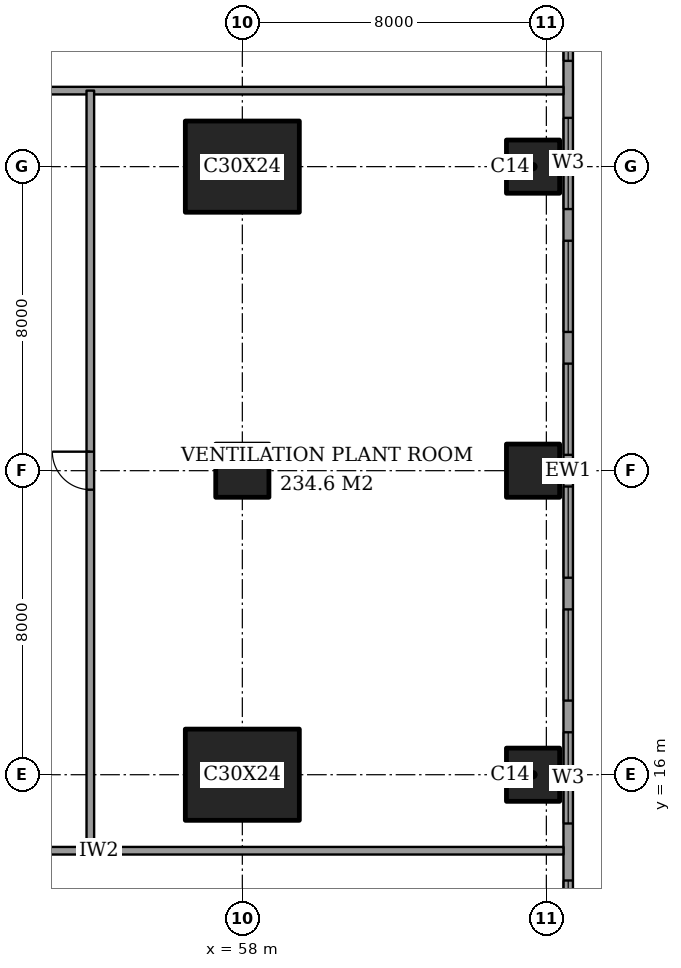
"""IFC4 building model, lengths in metres.
Left out: names, types, materials, properties, quantities, classifications, styles, units other than length and angle.
Written with IfcOpenShell. Run it as: python <this file> out.ifc"""

import sys

from ifc_helpers import new_model, si_unit, direction, frame, frame_2d, origin, origin_2d, place, context, subcontext, project, spatial, rectangle, extrude, element, fill, save


model = new_model("IFC4")
c1 = context("Model", 3, precision=1e-05, world=origin(), true_north=direction((0.0, 1.0)))
c2 = subcontext(c1, "Body", "Model", "MODEL_VIEW")
j1 = project(units=[si_unit("LENGTHUNIT", "METRE"), si_unit("PLANEANGLEUNIT", "RADIAN")], contexts=[c1])
p1 = place(None, origin())
s1 = spatial("IfcSite", under=j1, at=p1, CompositionType="ELEMENT")
p2 = place(p1, origin())
s2 = spatial("IfcBuilding", under=s1, at=p2, CompositionType="ELEMENT")
p3 = place(p2, frame((0.0, 0.0, 296.6)))
s3 = spatial("IfcBuildingStorey", under=s2, at=p3, CompositionType="ELEMENT", Elevation=296.6)
p4 = place(p3, frame((58.0, 16.0, 0.0), z_axis=(0.0, 0.0, 1.0), x_axis=(1.0, 0.0, 0.0)))
e1 = element("IfcColumn", 1, at=p4, inside=s3, PredefinedType="COLUMN", context=c2, shape_type="SweptSolid", body=[
    extrude(rectangle(XDim=3.0, YDim=2.4, at=origin_2d()), origin(), (0.0, 0.0, 1.0), 5.0),
])
p5 = place(p3, frame((58.0, 24.0, 0.0), z_axis=(0.0, 0.0, 1.0), x_axis=(1.0, 0.0, 0.0)))
e2 = element("IfcColumn", 2, at=p5, inside=s3, PredefinedType="COLUMN", context=c2, shape_type="SweptSolid", body=[
    extrude(rectangle(XDim=1.4, YDim=1.4, at=origin_2d()), origin(), (0.0, 0.0, 1.0), 5.0),
])
p6 = place(p3, frame((58.0, 32.0, 0.0), z_axis=(0.0, 0.0, 1.0), x_axis=(1.0, 0.0, 0.0)))
e3 = element("IfcColumn", 3, at=p6, inside=s3, PredefinedType="COLUMN", context=c2, shape_type="SweptSolid", body=[
    extrude(rectangle(XDim=3.0, YDim=2.4, at=origin_2d()), origin(), (0.0, 0.0, 1.0), 5.0),
])
for number, where, z_axis, x_axis in (
    (4, (65.65, 16.0, 0.0), (0.0, 0.0, 1.0), (1.0, 0.0, 0.0)),
    (5, (65.65, 24.0, 0.0), (0.0, 0.0, 1.0), (1.0, 0.0, 0.0)),
    (6, (65.65, 32.0, 0.0), (0.0, 0.0, 1.0), (1.0, 0.0, 0.0)),
):
    element("IfcColumn", number, at=place(p3, frame(where, z_axis=z_axis, x_axis=x_axis)), inside=s3, PredefinedType="COLUMN", context=c2, shape_type="SweptSolid", body=[
        extrude(rectangle(XDim=1.4, YDim=1.4, at=origin_2d()), origin(), (0.0, 0.0, 1.0), 5.0),
    ])
p7 = place(p3, frame((66.575, 3.175, 0.0), z_axis=(0.0, 0.0, 1.0), x_axis=(0.0, 1.0, 0.0)))
e7 = element("IfcWall", 7, at=p7, inside=s3, PredefinedType="SOLIDWALL", context=c2, shape_type="SweptSolid", body=[
    extrude(rectangle(XDim=41.65, YDim=0.25, at=frame_2d((20.825, 0.0))), origin(), (0.0, 0.0, 1.0), 5.0),
])
p8 = place(p7, frame((0.908, 0.0, 0.6)))
e8 = element("IfcOpeningElement", 8, at=p8, cuts=e7, PredefinedType="OPENING", context=c2, shape_type="SweptSolid", body=[
    extrude(rectangle(XDim=2.4, YDim=3.0, at=frame_2d((1.2, 1.5))), frame((0.0, 0.135, 0.0), z_axis=(0.0, -1.0, 0.0), x_axis=(1.0, 0.0, 0.0)), (0.0, 0.0, 1.0), 0.27),
])
p9 = place(p7, frame((4.275, 0.0, 0.6)))
e9 = element("IfcOpeningElement", 9, at=p9, cuts=e7, PredefinedType="OPENING", context=c2, shape_type="SweptSolid", body=[
    extrude(rectangle(XDim=2.4, YDim=3.0, at=frame_2d((1.2, 1.5))), frame((0.0, 0.135, 0.0), z_axis=(0.0, -1.0, 0.0), x_axis=(1.0, 0.0, 0.0)), (0.0, 0.0, 1.0), 0.27),
])
p10 = place(p7, frame((7.642, 0.0, 0.6)))
e10 = element("IfcOpeningElement", 10, at=p10, cuts=e7, PredefinedType="OPENING", context=c2, shape_type="SweptSolid", body=[
    extrude(rectangle(XDim=2.4, YDim=3.0, at=frame_2d((1.2, 1.5))), frame((0.0, 0.135, 0.0), z_axis=(0.0, -1.0, 0.0), x_axis=(1.0, 0.0, 0.0)), (0.0, 0.0, 1.0), 0.27),
])
p11 = place(p7, frame((11.542, 0.0, 0.6)))
e11 = element("IfcOpeningElement", 11, at=p11, cuts=e7, PredefinedType="OPENING", context=c2, shape_type="SweptSolid", body=[
    extrude(rectangle(XDim=2.4, YDim=3.0, at=frame_2d((1.2, 1.5))), frame((0.0, 0.135, 0.0), z_axis=(0.0, -1.0, 0.0), x_axis=(1.0, 0.0, 0.0)), (0.0, 0.0, 1.0), 0.27),
])
p12 = place(p7, frame((14.775, 0.0, 0.6)))
e12 = element("IfcOpeningElement", 12, at=p12, cuts=e7, PredefinedType="OPENING", context=c2, shape_type="SweptSolid", body=[
    extrude(rectangle(XDim=2.4, YDim=3.0, at=frame_2d((1.2, 1.5))), frame((0.0, 0.135, 0.0), z_axis=(0.0, -1.0, 0.0), x_axis=(1.0, 0.0, 0.0)), (0.0, 0.0, 1.0), 0.27),
])
p13 = place(p7, frame((18.008, 0.0, 0.6)))
e13 = element("IfcOpeningElement", 13, at=p13, cuts=e7, PredefinedType="OPENING", context=c2, shape_type="SweptSolid", body=[
    extrude(rectangle(XDim=2.4, YDim=3.0, at=frame_2d((1.2, 1.5))), frame((0.0, 0.135, 0.0), z_axis=(0.0, -1.0, 0.0), x_axis=(1.0, 0.0, 0.0)), (0.0, 0.0, 1.0), 0.27),
])
p14 = place(p7, frame((21.242, 0.0, 0.6)))
e14 = element("IfcOpeningElement", 14, at=p14, cuts=e7, PredefinedType="OPENING", context=c2, shape_type="SweptSolid", body=[
    extrude(rectangle(XDim=2.4, YDim=3.0, at=frame_2d((1.2, 1.5))), frame((0.0, 0.135, 0.0), z_axis=(0.0, -1.0, 0.0), x_axis=(1.0, 0.0, 0.0)), (0.0, 0.0, 1.0), 0.27),
])
p15 = place(p7, frame((24.475, 0.0, 0.6)))
e15 = element("IfcOpeningElement", 15, at=p15, cuts=e7, PredefinedType="OPENING", context=c2, shape_type="SweptSolid", body=[
    extrude(rectangle(XDim=2.4, YDim=3.0, at=frame_2d((1.2, 1.5))), frame((0.0, 0.135, 0.0), z_axis=(0.0, -1.0, 0.0), x_axis=(1.0, 0.0, 0.0)), (0.0, 0.0, 1.0), 0.27),
])
p16 = place(p7, frame((27.708, 0.0, 0.6)))
e16 = element("IfcOpeningElement", 16, at=p16, cuts=e7, PredefinedType="OPENING", context=c2, shape_type="SweptSolid", body=[
    extrude(rectangle(XDim=2.4, YDim=3.0, at=frame_2d((1.2, 1.5))), frame((0.0, 0.135, 0.0), z_axis=(0.0, -1.0, 0.0), x_axis=(1.0, 0.0, 0.0)), (0.0, 0.0, 1.0), 0.27),
])
p17 = place(p7, frame((31.608, 0.0, 0.6)))
e17 = element("IfcOpeningElement", 17, at=p17, cuts=e7, PredefinedType="OPENING", context=c2, shape_type="SweptSolid", body=[
    extrude(rectangle(XDim=2.4, YDim=3.0, at=frame_2d((1.2, 1.5))), frame((0.0, 0.135, 0.0), z_axis=(0.0, -1.0, 0.0), x_axis=(1.0, 0.0, 0.0)), (0.0, 0.0, 1.0), 0.27),
])
p18 = place(p7, frame((34.975, 0.0, 0.6)))
e18 = element("IfcOpeningElement", 18, at=p18, cuts=e7, PredefinedType="OPENING", context=c2, shape_type="SweptSolid", body=[
    extrude(rectangle(XDim=2.4, YDim=3.0, at=frame_2d((1.2, 1.5))), frame((0.0, 0.135, 0.0), z_axis=(0.0, -1.0, 0.0), x_axis=(1.0, 0.0, 0.0)), (0.0, 0.0, 1.0), 0.27),
])
p19 = place(p7, frame((38.342, 0.0, 0.6)))
e19 = element("IfcOpeningElement", 19, at=p19, cuts=e7, PredefinedType="OPENING", context=c2, shape_type="SweptSolid", body=[
    extrude(rectangle(XDim=2.4, YDim=3.0, at=frame_2d((1.2, 1.5))), frame((0.0, 0.135, 0.0), z_axis=(0.0, -1.0, 0.0), x_axis=(1.0, 0.0, 0.0)), (0.0, 0.0, 1.0), 0.27),
])
p20 = place(p3, frame((42.0, 14.0, 0.0), z_axis=(0.0, 0.0, 1.0), x_axis=(1.0, 0.0, 0.0)))
e20 = element("IfcWall", 20, at=p20, inside=s3, PredefinedType="PARTITIONING", context=c2, shape_type="SweptSolid", body=[
    extrude(rectangle(XDim=24.45, YDim=0.2, at=frame_2d((12.225, 0.0))), origin(), (0.0, 0.0, 1.0), 4.7),
])
p21 = place(p20, frame((9.55, 0.0, 0.0)))
e21 = element("IfcOpeningElement", 21, at=p21, cuts=e20, PredefinedType="OPENING", context=c2, shape_type="SweptSolid", body=[
    extrude(rectangle(XDim=1.0, YDim=2.1, at=frame_2d((0.5, 1.05))), frame((0.0, 0.11, 0.0), z_axis=(0.0, -1.0, 0.0), x_axis=(1.0, 0.0, 0.0)), (0.0, 0.0, 1.0), 0.22),
])
p22 = place(p3, frame((42.0, 34.0, 0.0), z_axis=(0.0, 0.0, 1.0), x_axis=(1.0, 0.0, 0.0)))
e22 = element("IfcWall", 22, at=p22, inside=s3, PredefinedType="PARTITIONING", context=c2, shape_type="SweptSolid", body=[
    extrude(rectangle(XDim=24.45, YDim=0.2, at=frame_2d((12.225, 0.0))), origin(), (0.0, 0.0, 1.0), 4.7),
])
p23 = place(p22, frame((9.35, 0.0, 0.0)))
e23 = element("IfcOpeningElement", 23, at=p23, cuts=e22, PredefinedType="OPENING", context=c2, shape_type="SweptSolid", body=[
    extrude(rectangle(XDim=1.0, YDim=2.1, at=frame_2d((0.5, 1.05))), frame((0.0, 0.11, 0.0), z_axis=(0.0, -1.0, 0.0), x_axis=(1.0, 0.0, 0.0)), (0.0, 0.0, 1.0), 0.22),
])
p24 = place(p3, frame((54.0, 14.0, 0.0), z_axis=(0.0, 0.0, 1.0), x_axis=(0.0, 1.0, 0.0)))
e24 = element("IfcWall", 24, at=p24, inside=s3, PredefinedType="PARTITIONING", context=c2, shape_type="SweptSolid", body=[
    extrude(rectangle(XDim=20.0, YDim=0.2, at=frame_2d((10.0, 0.0))), origin(), (0.0, 0.0, 1.0), 4.7),
])
p25 = place(p24, frame((9.5, 0.0, 0.0)))
e25 = element("IfcOpeningElement", 25, at=p25, cuts=e24, PredefinedType="OPENING", context=c2, shape_type="SweptSolid", body=[
    extrude(rectangle(XDim=1.0, YDim=2.1, at=frame_2d((0.5, 1.05))), frame((0.0, 0.11, 0.0), z_axis=(0.0, -1.0, 0.0), x_axis=(1.0, 0.0, 0.0)), (0.0, 0.0, 1.0), 0.22),
])
p26 = place(p10, origin())
e26 = element("IfcWindow", 26, at=p26, inside=s3, PartitioningType="SINGLE_PANEL", PredefinedType="WINDOW", context=c2, shape_type="SweptSolid", body=[
    extrude(rectangle(XDim=2.4, YDim=3.0, at=frame_2d((1.2, 1.5))), frame((0.0, 0.03, 0.0), z_axis=(0.0, -1.0, 0.0), x_axis=(1.0, 0.0, 0.0)), (0.0, 0.0, 1.0), 0.06),
])
fill(e10, e26)
p27 = place(p11, origin())
e27 = element("IfcWindow", 27, at=p27, inside=s3, PartitioningType="SINGLE_PANEL", PredefinedType="WINDOW", context=c2, shape_type="SweptSolid", body=[
    extrude(rectangle(XDim=2.4, YDim=3.0, at=frame_2d((1.2, 1.5))), frame((0.0, 0.03, 0.0), z_axis=(0.0, -1.0, 0.0), x_axis=(1.0, 0.0, 0.0)), (0.0, 0.0, 1.0), 0.06),
])
fill(e11, e27)
p28 = place(p12, origin())
e28 = element("IfcWindow", 28, at=p28, inside=s3, PartitioningType="SINGLE_PANEL", PredefinedType="WINDOW", context=c2, shape_type="SweptSolid", body=[
    extrude(rectangle(XDim=2.4, YDim=3.0, at=frame_2d((1.2, 1.5))), frame((0.0, 0.03, 0.0), z_axis=(0.0, -1.0, 0.0), x_axis=(1.0, 0.0, 0.0)), (0.0, 0.0, 1.0), 0.06),
])
fill(e12, e28)
p29 = place(p13, origin())
e29 = element("IfcWindow", 29, at=p29, inside=s3, PartitioningType="SINGLE_PANEL", PredefinedType="WINDOW", context=c2, shape_type="SweptSolid", body=[
    extrude(rectangle(XDim=2.4, YDim=3.0, at=frame_2d((1.2, 1.5))), frame((0.0, 0.03, 0.0), z_axis=(0.0, -1.0, 0.0), x_axis=(1.0, 0.0, 0.0)), (0.0, 0.0, 1.0), 0.06),
])
fill(e13, e29)
p30 = place(p14, origin())
e30 = element("IfcWindow", 30, at=p30, inside=s3, PartitioningType="SINGLE_PANEL", PredefinedType="WINDOW", context=c2, shape_type="SweptSolid", body=[
    extrude(rectangle(XDim=2.4, YDim=3.0, at=frame_2d((1.2, 1.5))), frame((0.0, 0.03, 0.0), z_axis=(0.0, -1.0, 0.0), x_axis=(1.0, 0.0, 0.0)), (0.0, 0.0, 1.0), 0.06),
])
fill(e14, e30)
p31 = place(p15, origin())
e31 = element("IfcWindow", 31, at=p31, inside=s3, PartitioningType="SINGLE_PANEL", PredefinedType="WINDOW", context=c2, shape_type="SweptSolid", body=[
    extrude(rectangle(XDim=2.4, YDim=3.0, at=frame_2d((1.2, 1.5))), frame((0.0, 0.03, 0.0), z_axis=(0.0, -1.0, 0.0), x_axis=(1.0, 0.0, 0.0)), (0.0, 0.0, 1.0), 0.06),
])
fill(e15, e31)
p32 = place(p16, origin())
e32 = element("IfcWindow", 32, at=p32, inside=s3, PartitioningType="SINGLE_PANEL", PredefinedType="WINDOW", context=c2, shape_type="SweptSolid", body=[
    extrude(rectangle(XDim=2.4, YDim=3.0, at=frame_2d((1.2, 1.5))), frame((0.0, 0.03, 0.0), z_axis=(0.0, -1.0, 0.0), x_axis=(1.0, 0.0, 0.0)), (0.0, 0.0, 1.0), 0.06),
])
fill(e16, e32)
p33 = place(p17, origin())
e33 = element("IfcWindow", 33, at=p33, inside=s3, PartitioningType="SINGLE_PANEL", PredefinedType="WINDOW", context=c2, shape_type="SweptSolid", body=[
    extrude(rectangle(XDim=2.4, YDim=3.0, at=frame_2d((1.2, 1.5))), frame((0.0, 0.03, 0.0), z_axis=(0.0, -1.0, 0.0), x_axis=(1.0, 0.0, 0.0)), (0.0, 0.0, 1.0), 0.06),
])
fill(e17, e33)
p34 = place(p25, origin())
e34 = element("IfcDoor", 34, at=p34, inside=s3, OperationType="SINGLE_SWING_LEFT", PredefinedType="DOOR", context=c2, shape_type="SweptSolid", body=[
    extrude(rectangle(XDim=1.0, YDim=2.1, at=frame_2d((0.5, 1.05))), frame((0.0, 0.025, 0.0), z_axis=(0.0, -1.0, 0.0), x_axis=(1.0, 0.0, 0.0)), (0.0, 0.0, 1.0), 0.05),
])
fill(e25, e34)
save(model, sys.argv[1])
